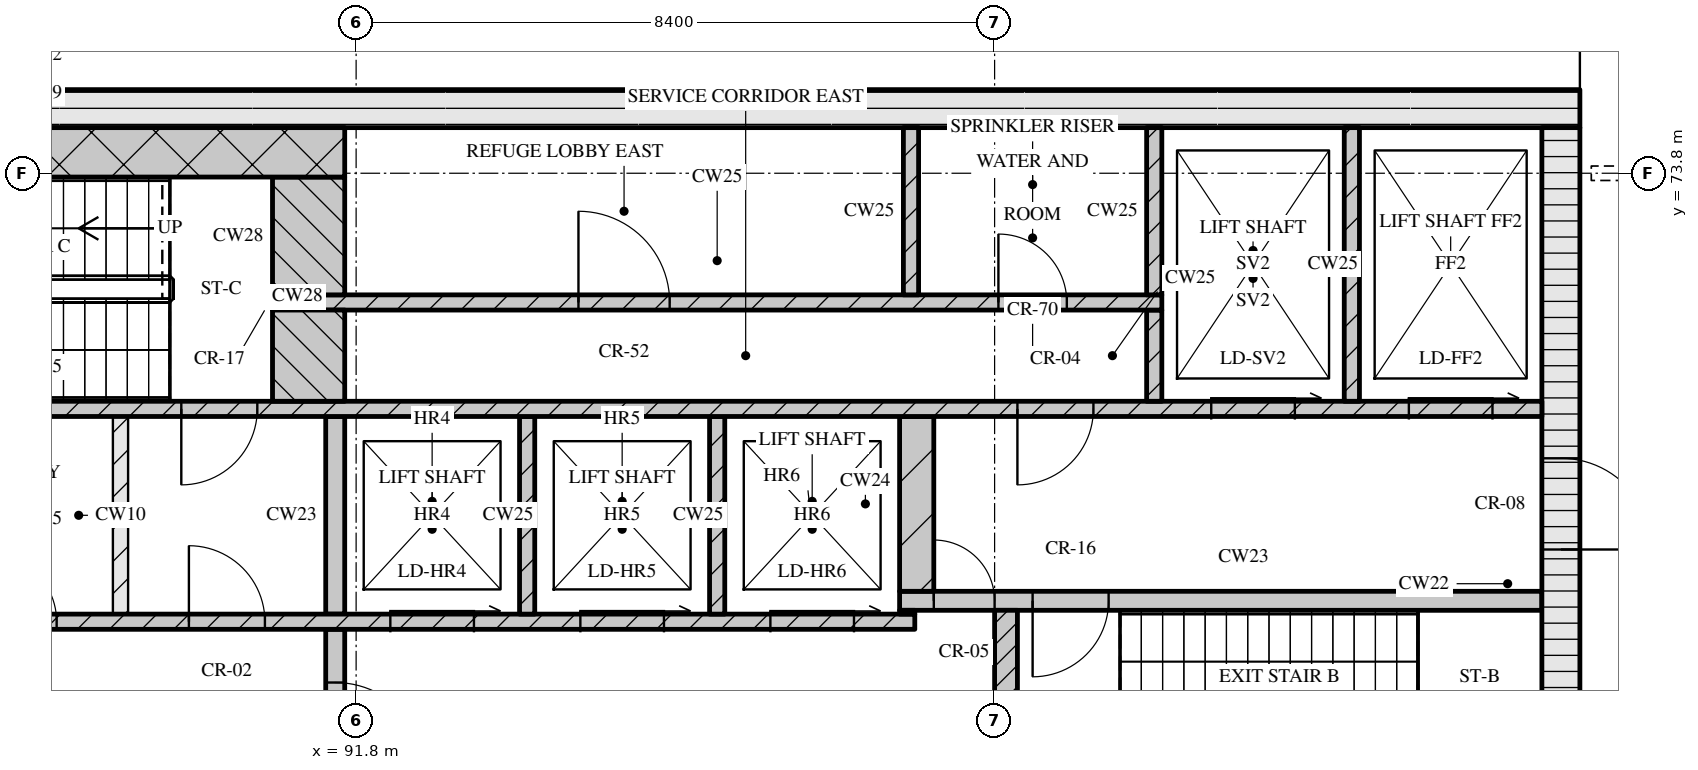
"""IFC4 building model, lengths in metres.
Left out: names, types, materials, properties, quantities, classifications, styles, units other than length and angle.
Written with IfcOpenShell. Run it as: python <this file> out.ifc"""

import sys

from ifc_helpers import new_model, si_unit, direction, frame, frame_2d, origin, place, context, subcontext, project, spatial, rectangle, extrude, element, fill, save


model = new_model("IFC4")
c1 = context("Model", 3, precision=1e-05, world=origin(), true_north=direction((0.0, 1.0)))
c2 = subcontext(c1, "Body", "Model", "MODEL_VIEW")
j1 = project(units=[si_unit("LENGTHUNIT", "METRE"), si_unit("PLANEANGLEUNIT", "RADIAN")], contexts=[c1])
p1 = place(None, origin())
s1 = spatial("IfcSite", under=j1, at=p1, CompositionType="ELEMENT")
p2 = place(p1, origin())
s2 = spatial("IfcBuilding", under=s1, at=p2, CompositionType="ELEMENT")
p3 = place(p2, frame((0.0, 0.0, 252.3)))
s3 = spatial("IfcBuildingStorey", under=s2, at=p3, CompositionType="ELEMENT", Elevation=252.3)
p4 = place(p3, frame((67.3, 74.65, 0.0), z_axis=(0.0, 0.0, 1.0), x_axis=(1.0, 0.0, 0.0)))
e1 = element("IfcWall", 1, at=p4, inside=s3, PredefinedType="SOLIDWALL", context=c2, shape_type="SweptSolid", body=[
    extrude(rectangle(XDim=40.6, YDim=0.5, at=frame_2d((20.3, 0.0))), origin(), (0.0, 0.0, 1.0), 10.97),
])
p5 = place(p3, frame((107.65, 62.4, 0.0), z_axis=(0.0, 0.0, 1.0), x_axis=(0.0, 1.0, 0.0)))
e2 = element("IfcWall", 2, at=p5, inside=s3, PredefinedType="SOLIDWALL", context=c2, shape_type="SweptSolid", body=[
    extrude(rectangle(XDim=12.0, YDim=0.5, at=frame_2d((6.0, 0.0))), origin(), (0.0, 0.0, 1.0), 10.97),
])
p6 = place(p5, frame((6.45, 0.0, 0.0)))
e3 = element("IfcOpeningElement", 3, at=p6, cuts=e2, PredefinedType="OPENING", context=c2, shape_type="SweptSolid", body=[
    extrude(rectangle(XDim=1.2, YDim=2.1, at=frame_2d((0.6, 1.05))), frame((0.0, 0.26, 0.0), z_axis=(0.0, -1.0, 0.0), x_axis=(1.0, 0.0, 0.0)), (0.0, 0.0, 1.0), 0.52),
])
p7 = place(p3, frame((91.525, 65.2, 0.0), z_axis=(0.0, 0.0, 1.0), x_axis=(0.0, 1.0, 0.0)))
e4 = element("IfcWall", 4, at=p7, inside=s3, PredefinedType="SOLIDWALL", context=c2, shape_type="SweptSolid", body=[
    extrude(rectangle(XDim=2.6, YDim=0.25, at=frame_2d((1.3, 0.0))), origin(), (0.0, 0.0, 1.0), 10.97),
])
p8 = place(p7, frame((0.7, 0.0, 0.0)))
e5 = element("IfcOpeningElement", 5, at=p8, cuts=e4, PredefinedType="OPENING", context=c2, shape_type="SweptSolid", body=[
    extrude(rectangle(XDim=1.2, YDim=2.1, at=frame_2d((0.6, 1.05))), frame((0.0, 0.135, 0.0), z_axis=(0.0, -1.0, 0.0), x_axis=(1.0, 0.0, 0.0)), (0.0, 0.0, 1.0), 0.27),
])
p9 = place(p3, frame((100.35, 65.2, 0.0), z_axis=(0.0, 0.0, 1.0), x_axis=(0.0, 1.0, 0.0)))
e6 = element("IfcWall", 6, at=p9, inside=s3, PredefinedType="SOLIDWALL", context=c2, shape_type="SweptSolid", body=[
    extrude(rectangle(XDim=2.85, YDim=0.3, at=frame_2d((1.425, 0.0))), origin(), (0.0, 0.0, 1.0), 10.97),
])
p10 = place(p3, frame((76.05, 67.9, 0.0), z_axis=(0.0, 0.0, 1.0), x_axis=(1.0, 0.0, 0.0)))
e7 = element("IfcWall", 7, at=p10, inside=s3, PredefinedType="SOLIDWALL", context=c2, shape_type="SweptSolid", body=[
    extrude(rectangle(XDim=23.1, YDim=0.2, at=frame_2d((11.55, 0.0))), origin(), (0.0, 0.0, 1.0), 10.97),
])
p11 = place(p10, frame((0.75, 0.0, 0.0)))
e8 = element("IfcOpeningElement", 8, at=p11, cuts=e7, PredefinedType="OPENING", context=c2, shape_type="SweptSolid", body=[
    extrude(rectangle(XDim=0.9, YDim=2.1, at=frame_2d((0.45, 1.05))), frame((0.0, 0.11, 0.0), z_axis=(0.0, -1.0, 0.0), x_axis=(1.0, 0.0, 0.0)), (0.0, 0.0, 1.0), 0.22),
])
p12 = place(p10, frame((3.32, 0.0, 0.0)))
e9 = element("IfcOpeningElement", 9, at=p12, cuts=e7, PredefinedType="OPENING", context=c2, shape_type="SweptSolid", body=[
    extrude(rectangle(XDim=0.9, YDim=2.1, at=frame_2d((0.45, 1.05))), frame((0.0, 0.11, 0.0), z_axis=(0.0, -1.0, 0.0), x_axis=(1.0, 0.0, 0.0)), (0.0, 0.0, 1.0), 0.22),
])
p13 = place(p10, frame((5.77, 0.0, 0.0)))
e10 = element("IfcOpeningElement", 10, at=p13, cuts=e7, PredefinedType="OPENING", context=c2, shape_type="SweptSolid", body=[
    extrude(rectangle(XDim=0.9, YDim=2.1, at=frame_2d((0.45, 1.05))), frame((0.0, 0.11, 0.0), z_axis=(0.0, -1.0, 0.0), x_axis=(1.0, 0.0, 0.0)), (0.0, 0.0, 1.0), 0.22),
])
p14 = place(p10, frame((8.45, 0.0, 0.0)))
e11 = element("IfcOpeningElement", 11, at=p14, cuts=e7, PredefinedType="OPENING", context=c2, shape_type="SweptSolid", body=[
    extrude(rectangle(XDim=0.9, YDim=2.1, at=frame_2d((0.45, 1.05))), frame((0.0, 0.11, 0.0), z_axis=(0.0, -1.0, 0.0), x_axis=(1.0, 0.0, 0.0)), (0.0, 0.0, 1.0), 0.22),
])
p15 = place(p10, frame((10.91, 0.0, 0.0)))
e12 = element("IfcOpeningElement", 12, at=p15, cuts=e7, PredefinedType="OPENING", context=c2, shape_type="SweptSolid", body=[
    extrude(rectangle(XDim=0.9, YDim=2.1, at=frame_2d((0.45, 1.05))), frame((0.0, 0.11, 0.0), z_axis=(0.0, -1.0, 0.0), x_axis=(1.0, 0.0, 0.0)), (0.0, 0.0, 1.0), 0.22),
])
p16 = place(p10, frame((13.55, 0.0, 0.0)))
e13 = element("IfcOpeningElement", 13, at=p16, cuts=e7, PredefinedType="OPENING", context=c2, shape_type="SweptSolid", body=[
    extrude(rectangle(XDim=1.0, YDim=2.1, at=frame_2d((0.5, 1.05))), frame((0.0, 0.11, 0.0), z_axis=(0.0, -1.0, 0.0), x_axis=(1.0, 0.0, 0.0)), (0.0, 0.0, 1.0), 0.22),
])
p17 = place(p10, frame((16.2, 0.0, 0.0)))
e14 = element("IfcOpeningElement", 14, at=p17, cuts=e7, PredefinedType="OPENING", context=c2, shape_type="SweptSolid", body=[
    extrude(rectangle(XDim=1.1, YDim=2.1, at=frame_2d((0.55, 1.05))), frame((0.0, 0.11, 0.0), z_axis=(0.0, -1.0, 0.0), x_axis=(1.0, 0.0, 0.0)), (0.0, 0.0, 1.0), 0.22),
])
p18 = place(p10, frame((18.7, 0.0, 0.0)))
e15 = element("IfcOpeningElement", 15, at=p18, cuts=e7, PredefinedType="OPENING", context=c2, shape_type="SweptSolid", body=[
    extrude(rectangle(XDim=1.1, YDim=2.1, at=frame_2d((0.55, 1.05))), frame((0.0, 0.11, 0.0), z_axis=(0.0, -1.0, 0.0), x_axis=(1.0, 0.0, 0.0)), (0.0, 0.0, 1.0), 0.22),
])
p19 = place(p10, frame((21.2, 0.0, 0.0)))
e16 = element("IfcOpeningElement", 16, at=p19, cuts=e7, PredefinedType="OPENING", context=c2, shape_type="SweptSolid", body=[
    extrude(rectangle(XDim=1.1, YDim=2.1, at=frame_2d((0.55, 1.05))), frame((0.0, 0.11, 0.0), z_axis=(0.0, -1.0, 0.0), x_axis=(1.0, 0.0, 0.0)), (0.0, 0.0, 1.0), 0.22),
])
p20 = place(p3, frame((88.7, 68.0, 0.0), z_axis=(0.0, 0.0, 1.0), x_axis=(0.0, 1.0, 0.0)))
e17 = element("IfcWall", 17, at=p20, inside=s3, PredefinedType="PARTITIONING", context=c2, shape_type="SweptSolid", body=[
    extrude(rectangle(XDim=2.6, YDim=0.2, at=frame_2d((1.3, 0.0))), origin(), (0.0, 0.0, 1.0), 10.97),
])
p21 = place(p3, frame((91.525, 68.0, 0.0), z_axis=(0.0, 0.0, 1.0), x_axis=(0.0, 1.0, 0.0)))
e18 = element("IfcWall", 18, at=p21, inside=s3, PredefinedType="SOLIDWALL", context=c2, shape_type="SweptSolid", body=[
    extrude(rectangle(XDim=2.6, YDim=0.25, at=frame_2d((1.3, 0.0))), origin(), (0.0, 0.0, 1.0), 10.97),
])
for number, where, z_axis, x_axis in (
    (19, (94.05, 68.0, 0.0), (0.0, 0.0, 1.0), (0.0, 1.0, 0.0)),
    (20, (96.55, 68.0, 0.0), (0.0, 0.0, 1.0), (0.0, 1.0, 0.0)),
):
    element("IfcWall", number, at=place(p3, frame(where, z_axis=z_axis, x_axis=x_axis)), inside=s3, PredefinedType="SOLIDWALL", context=c2, shape_type="SweptSolid", body=[
        extrude(rectangle(XDim=2.6, YDim=0.2, at=frame_2d((1.3, 0.0))), origin(), (0.0, 0.0, 1.0), 10.97),
    ])
p22 = place(p3, frame((98.95, 68.025, 0.0), z_axis=(0.0, 0.0, 1.0), x_axis=(1.0, 0.0, 0.0)))
e21 = element("IfcWall", 21, at=p22, inside=s3, PredefinedType="SOLIDWALL", context=c2, shape_type="SweptSolid", body=[
    extrude(rectangle(XDim=0.2, YDim=0.05, at=frame_2d((0.1, 0.0))), origin(), (0.0, 0.0, 1.0), 10.97),
])
p23 = place(p3, frame((98.95, 68.175, 0.0), z_axis=(0.0, 0.0, 1.0), x_axis=(1.0, 0.0, 0.0)))
e22 = element("IfcWall", 22, at=p23, inside=s3, PredefinedType="SOLIDWALL", context=c2, shape_type="SweptSolid", body=[
    extrude(rectangle(XDim=8.45, YDim=0.25, at=frame_2d((4.225, 0.0))), origin(), (0.0, 0.0, 1.0), 10.97),
])
p24 = place(p23, frame((0.45, 0.0, 0.0)))
e23 = element("IfcOpeningElement", 23, at=p24, cuts=e22, PredefinedType="OPENING", context=c2, shape_type="SweptSolid", body=[
    extrude(rectangle(XDim=0.8, YDim=2.1, at=frame_2d((0.4, 1.05))), frame((0.0, 0.135, 0.0), z_axis=(0.0, -1.0, 0.0), x_axis=(1.0, 0.0, 0.0)), (0.0, 0.0, 1.0), 0.27),
])
p25 = place(p23, frame((1.75, 0.0, 0.0)))
e24 = element("IfcOpeningElement", 24, at=p25, cuts=e22, PredefinedType="OPENING", context=c2, shape_type="SweptSolid", body=[
    extrude(rectangle(XDim=1.0, YDim=2.1, at=frame_2d((0.5, 1.05))), frame((0.0, 0.135, 0.0), z_axis=(0.0, -1.0, 0.0), x_axis=(1.0, 0.0, 0.0)), (0.0, 0.0, 1.0), 0.27),
])
p26 = place(p3, frame((99.175, 68.3, 0.0), z_axis=(0.0, 0.0, 1.0), x_axis=(0.0, 1.0, 0.0)))
e25 = element("IfcWall", 25, at=p26, inside=s3, PredefinedType="SOLIDWALL", context=c2, shape_type="SweptSolid", body=[
    extrude(rectangle(XDim=2.3, YDim=0.45, at=frame_2d((1.15, 0.0))), origin(), (0.0, 0.0, 1.0), 10.97),
])
p27 = place(p3, frame((67.8, 70.7, 0.0), z_axis=(0.0, 0.0, 1.0), x_axis=(1.0, 0.0, 0.0)))
e26 = element("IfcWall", 26, at=p27, inside=s3, PredefinedType="SOLIDWALL", context=c2, shape_type="SweptSolid", body=[
    extrude(rectangle(XDim=39.6, YDim=0.2, at=frame_2d((19.8, 0.0))), origin(), (0.0, 0.0, 1.0), 10.97),
])
p28 = place(p27, frame((0.65, 0.0, 0.0)))
e27 = element("IfcOpeningElement", 27, at=p28, cuts=e26, PredefinedType="OPENING", context=c2, shape_type="SweptSolid", body=[
    extrude(rectangle(XDim=1.1, YDim=2.1, at=frame_2d((0.55, 1.05))), frame((0.0, 0.11, 0.0), z_axis=(0.0, -1.0, 0.0), x_axis=(1.0, 0.0, 0.0)), (0.0, 0.0, 1.0), 0.22),
])
p29 = place(p27, frame((3.25, 0.0, 0.0)))
e28 = element("IfcOpeningElement", 28, at=p29, cuts=e26, PredefinedType="OPENING", context=c2, shape_type="SweptSolid", body=[
    extrude(rectangle(XDim=1.1, YDim=2.1, at=frame_2d((0.55, 1.05))), frame((0.0, 0.11, 0.0), z_axis=(0.0, -1.0, 0.0), x_axis=(1.0, 0.0, 0.0)), (0.0, 0.0, 1.0), 0.22),
])
p30 = place(p27, frame((5.9, 0.0, 0.0)))
e29 = element("IfcOpeningElement", 29, at=p30, cuts=e26, PredefinedType="OPENING", context=c2, shape_type="SweptSolid", body=[
    extrude(rectangle(XDim=1.0, YDim=2.1, at=frame_2d((0.5, 1.05))), frame((0.0, 0.11, 0.0), z_axis=(0.0, -1.0, 0.0), x_axis=(1.0, 0.0, 0.0)), (0.0, 0.0, 1.0), 0.22),
])
p31 = place(p27, frame((21.7, 0.0, 0.0)))
e30 = element("IfcOpeningElement", 30, at=p31, cuts=e26, PredefinedType="OPENING", context=c2, shape_type="SweptSolid", body=[
    extrude(rectangle(XDim=1.0, YDim=2.1, at=frame_2d((0.5, 1.05))), frame((0.0, 0.11, 0.0), z_axis=(0.0, -1.0, 0.0), x_axis=(1.0, 0.0, 0.0)), (0.0, 0.0, 1.0), 0.22),
])
p32 = place(p27, frame((32.7, 0.0, 0.0)))
e31 = element("IfcOpeningElement", 31, at=p32, cuts=e26, PredefinedType="OPENING", context=c2, shape_type="SweptSolid", body=[
    extrude(rectangle(XDim=1.0, YDim=2.1, at=frame_2d((0.5, 1.05))), frame((0.0, 0.11, 0.0), z_axis=(0.0, -1.0, 0.0), x_axis=(1.0, 0.0, 0.0)), (0.0, 0.0, 1.0), 0.22),
])
p33 = place(p27, frame((35.25, 0.0, 0.0)))
e32 = element("IfcOpeningElement", 32, at=p33, cuts=e26, PredefinedType="OPENING", context=c2, shape_type="SweptSolid", body=[
    extrude(rectangle(XDim=1.1, YDim=2.1, at=frame_2d((0.55, 1.05))), frame((0.0, 0.11, 0.0), z_axis=(0.0, -1.0, 0.0), x_axis=(1.0, 0.0, 0.0)), (0.0, 0.0, 1.0), 0.22),
])
p34 = place(p27, frame((37.85, 0.0, 0.0)))
e33 = element("IfcOpeningElement", 33, at=p34, cuts=e26, PredefinedType="OPENING", context=c2, shape_type="SweptSolid", body=[
    extrude(rectangle(XDim=1.1, YDim=2.1, at=frame_2d((0.55, 1.05))), frame((0.0, 0.11, 0.0), z_axis=(0.0, -1.0, 0.0), x_axis=(1.0, 0.0, 0.0)), (0.0, 0.0, 1.0), 0.22),
])
p35 = place(p3, frame((91.175, 70.8, 0.0), z_axis=(0.0, 0.0, 1.0), x_axis=(0.0, 1.0, 0.0)))
e34 = element("IfcWall", 34, at=p35, inside=s3, PredefinedType="SOLIDWALL", context=c2, shape_type="SweptSolid", body=[
    extrude(rectangle(XDim=1.2, YDim=0.95, at=frame_2d((0.6, 0.0))), origin(), (0.0, 0.0, 1.0), 10.97),
])
p36 = place(p3, frame((102.3, 70.8, 0.0), z_axis=(0.0, 0.0, 1.0), x_axis=(0.0, 1.0, 0.0)))
e35 = element("IfcWall", 35, at=p36, inside=s3, PredefinedType="SOLIDWALL", context=c2, shape_type="SweptSolid", body=[
    extrude(rectangle(XDim=1.2, YDim=0.2, at=frame_2d((0.6, 0.0))), origin(), (0.0, 0.0, 1.0), 10.97),
])
p37 = place(p3, frame((104.9, 70.8, 0.0), z_axis=(0.0, 0.0, 1.0), x_axis=(0.0, 1.0, 0.0)))
e36 = element("IfcWall", 36, at=p37, inside=s3, PredefinedType="SOLIDWALL", context=c2, shape_type="SweptSolid", body=[
    extrude(rectangle(XDim=3.6, YDim=0.2, at=frame_2d((1.8, 0.0))), origin(), (0.0, 0.0, 1.0), 10.97),
])
p38 = place(p3, frame((90.7, 72.1, 0.0), z_axis=(0.0, 0.0, 1.0), x_axis=(1.0, 0.0, 0.0)))
e37 = element("IfcWall", 37, at=p38, inside=s3, PredefinedType="SOLIDWALL", context=c2, shape_type="SweptSolid", body=[
    extrude(rectangle(XDim=11.7, YDim=0.2, at=frame_2d((5.85, 0.0))), origin(), (0.0, 0.0, 1.0), 10.97),
])
p39 = place(p38, frame((4.025, 0.0, 0.0)))
e38 = element("IfcOpeningElement", 38, at=p39, cuts=e37, PredefinedType="OPENING", context=c2, shape_type="SweptSolid", body=[
    extrude(rectangle(XDim=1.2, YDim=2.1, at=frame_2d((0.6, 1.05))), frame((0.0, 0.11, 0.0), z_axis=(0.0, -1.0, 0.0), x_axis=(1.0, 0.0, 0.0)), (0.0, 0.0, 1.0), 0.22),
])
p40 = place(p38, frame((9.55, 0.0, 0.0)))
e39 = element("IfcOpeningElement", 39, at=p40, cuts=e37, PredefinedType="OPENING", context=c2, shape_type="SweptSolid", body=[
    extrude(rectangle(XDim=0.9, YDim=2.1, at=frame_2d((0.45, 1.05))), frame((0.0, 0.11, 0.0), z_axis=(0.0, -1.0, 0.0), x_axis=(1.0, 0.0, 0.0)), (0.0, 0.0, 1.0), 0.22),
])
p41 = place(p3, frame((91.175, 72.2, 0.0), z_axis=(0.0, 0.0, 1.0), x_axis=(0.0, 1.0, 0.0)))
e40 = element("IfcWall", 40, at=p41, inside=s3, PredefinedType="SOLIDWALL", context=c2, shape_type="SweptSolid", body=[
    extrude(rectangle(XDim=1.55, YDim=0.95, at=frame_2d((0.775, 0.0))), origin(), (0.0, 0.0, 1.0), 10.97),
])
for number, where, z_axis, x_axis in (
    (41, (99.1, 72.2, 0.0), (0.0, 0.0, 1.0), (0.0, 1.0, 0.0)),
    (42, (102.3, 72.2, 0.0), (0.0, 0.0, 1.0), (0.0, 1.0, 0.0)),
):
    element("IfcWall", number, at=place(p3, frame(where, z_axis=z_axis, x_axis=x_axis)), inside=s3, PredefinedType="SOLIDWALL", context=c2, shape_type="SweptSolid", body=[
        extrude(rectangle(XDim=2.2, YDim=0.2, at=frame_2d((1.1, 0.0))), origin(), (0.0, 0.0, 1.0), 10.97),
    ])
p42 = place(p3, frame((83.55, 74.075, 0.0), z_axis=(0.0, 0.0, 1.0), x_axis=(1.0, 0.0, 0.0)))
e43 = element("IfcWall", 43, at=p42, inside=s3, PredefinedType="SOLIDWALL", context=c2, shape_type="SweptSolid", body=[
    extrude(rectangle(XDim=8.1, YDim=0.65, at=frame_2d((4.05, 0.0))), origin(), (0.0, 0.0, 1.0), 10.97),
])
p43 = place(p8, origin())
e44 = element("IfcDoor", 44, at=p43, inside=s3, OperationType="SINGLE_SWING_RIGHT", PredefinedType="DOOR", context=c2, shape_type="SweptSolid", body=[
    extrude(rectangle(XDim=1.2, YDim=2.1, at=frame_2d((0.6, 1.05))), frame((0.0, 0.025, 0.0), z_axis=(0.0, -1.0, 0.0), x_axis=(1.0, 0.0, 0.0)), (0.0, 0.0, 1.0), 0.05),
])
fill(e5, e44)
p44 = place(p15, origin())
e45 = element("IfcDoor", 45, at=p44, inside=s3, OperationType="SINGLE_SWING_LEFT", PredefinedType="DOOR", context=c2, shape_type="SweptSolid", body=[
    extrude(rectangle(XDim=0.9, YDim=2.1, at=frame_2d((0.45, 1.05))), frame((0.0, 0.025, 0.0), z_axis=(0.0, -1.0, 0.0), x_axis=(1.0, 0.0, 0.0)), (0.0, 0.0, 1.0), 0.05),
])
fill(e12, e45)
p45 = place(p16, origin())
e46 = element("IfcDoor", 46, at=p45, inside=s3, OperationType="SINGLE_SWING_LEFT", PredefinedType="DOOR", context=c2, shape_type="SweptSolid", body=[
    extrude(rectangle(XDim=1.0, YDim=2.1, at=frame_2d((0.5, 1.05))), frame((0.0, 0.025, 0.0), z_axis=(0.0, -1.0, 0.0), x_axis=(1.0, 0.0, 0.0)), (0.0, 0.0, 1.0), 0.05),
])
fill(e13, e46)
p46 = place(p17, origin())
e47 = element("IfcDoor", 47, at=p46, inside=s3, OperationType="SLIDING_TO_RIGHT", PredefinedType="DOOR", context=c2, shape_type="SweptSolid", body=[
    extrude(rectangle(XDim=1.1, YDim=2.1, at=frame_2d((0.55, 1.05))), frame((0.0, 0.025, 0.0), z_axis=(0.0, -1.0, 0.0), x_axis=(1.0, 0.0, 0.0)), (0.0, 0.0, 1.0), 0.05),
])
fill(e14, e47)
p47 = place(p18, origin())
e48 = element("IfcDoor", 48, at=p47, inside=s3, OperationType="SLIDING_TO_RIGHT", PredefinedType="DOOR", context=c2, shape_type="SweptSolid", body=[
    extrude(rectangle(XDim=1.1, YDim=2.1, at=frame_2d((0.55, 1.05))), frame((0.0, 0.025, 0.0), z_axis=(0.0, -1.0, 0.0), x_axis=(1.0, 0.0, 0.0)), (0.0, 0.0, 1.0), 0.05),
])
fill(e15, e48)
p48 = place(p19, origin())
e49 = element("IfcDoor", 49, at=p48, inside=s3, OperationType="SLIDING_TO_RIGHT", PredefinedType="DOOR", context=c2, shape_type="SweptSolid", body=[
    extrude(rectangle(XDim=1.1, YDim=2.1, at=frame_2d((0.55, 1.05))), frame((0.0, 0.025, 0.0), z_axis=(0.0, -1.0, 0.0), x_axis=(1.0, 0.0, 0.0)), (0.0, 0.0, 1.0), 0.05),
])
fill(e16, e49)
p49 = place(p24, origin())
e50 = element("IfcDoor", 50, at=p49, inside=s3, OperationType="SINGLE_SWING_LEFT", PredefinedType="DOOR", context=c2, shape_type="SweptSolid", body=[
    extrude(rectangle(XDim=0.8, YDim=2.1, at=frame_2d((0.4, 1.05))), frame((0.0, 0.025, 0.0), z_axis=(0.0, -1.0, 0.0), x_axis=(1.0, 0.0, 0.0)), (0.0, 0.0, 1.0), 0.05),
])
fill(e23, e50)
p50 = place(p25, origin())
e51 = element("IfcDoor", 51, at=p50, inside=s3, OperationType="SINGLE_SWING_RIGHT", PredefinedType="DOOR", context=c2, shape_type="SweptSolid", body=[
    extrude(rectangle(XDim=1.0, YDim=2.1, at=frame_2d((0.5, 1.05))), frame((0.0, 0.025, 0.0), z_axis=(0.0, -1.0, 0.0), x_axis=(1.0, 0.0, 0.0)), (0.0, 0.0, 1.0), 0.05),
])
fill(e24, e51)
p51 = place(p6, origin())
e52 = element("IfcDoor", 52, at=p51, inside=s3, OperationType="SINGLE_SWING_RIGHT", PredefinedType="DOOR", context=c2, shape_type="SweptSolid", body=[
    extrude(rectangle(XDim=1.2, YDim=2.1, at=frame_2d((0.6, 1.05))), frame((0.0, 0.025, 0.0), z_axis=(0.0, -1.0, 0.0), x_axis=(1.0, 0.0, 0.0)), (0.0, 0.0, 1.0), 0.05),
])
fill(e3, e52)
p52 = place(p31, origin())
e53 = element("IfcDoor", 53, at=p52, inside=s3, OperationType="SINGLE_SWING_RIGHT", PredefinedType="DOOR", context=c2, shape_type="SweptSolid", body=[
    extrude(rectangle(XDim=1.0, YDim=2.1, at=frame_2d((0.5, 1.05))), frame((0.0, 0.025, 0.0), z_axis=(0.0, -1.0, 0.0), x_axis=(1.0, 0.0, 0.0)), (0.0, 0.0, 1.0), 0.05),
])
fill(e30, e53)
p53 = place(p32, origin())
e54 = element("IfcDoor", 54, at=p53, inside=s3, OperationType="SINGLE_SWING_RIGHT", PredefinedType="DOOR", context=c2, shape_type="SweptSolid", body=[
    extrude(rectangle(XDim=1.0, YDim=2.1, at=frame_2d((0.5, 1.05))), frame((0.0, 0.025, 0.0), z_axis=(0.0, -1.0, 0.0), x_axis=(1.0, 0.0, 0.0)), (0.0, 0.0, 1.0), 0.05),
])
fill(e31, e54)
p54 = place(p33, origin())
e55 = element("IfcDoor", 55, at=p54, inside=s3, OperationType="SLIDING_TO_RIGHT", PredefinedType="DOOR", context=c2, shape_type="SweptSolid", body=[
    extrude(rectangle(XDim=1.1, YDim=2.1, at=frame_2d((0.55, 1.05))), frame((0.0, 0.025, 0.0), z_axis=(0.0, -1.0, 0.0), x_axis=(1.0, 0.0, 0.0)), (0.0, 0.0, 1.0), 0.05),
])
fill(e32, e55)
p55 = place(p34, origin())
e56 = element("IfcDoor", 56, at=p55, inside=s3, OperationType="SLIDING_TO_RIGHT", PredefinedType="DOOR", context=c2, shape_type="SweptSolid", body=[
    extrude(rectangle(XDim=1.1, YDim=2.1, at=frame_2d((0.55, 1.05))), frame((0.0, 0.025, 0.0), z_axis=(0.0, -1.0, 0.0), x_axis=(1.0, 0.0, 0.0)), (0.0, 0.0, 1.0), 0.05),
])
fill(e33, e56)
p56 = place(p39, origin())
e57 = element("IfcDoor", 57, at=p56, inside=s3, OperationType="SINGLE_SWING_LEFT", PredefinedType="DOOR", context=c2, shape_type="SweptSolid", body=[
    extrude(rectangle(XDim=1.2, YDim=2.1, at=frame_2d((0.6, 1.05))), frame((0.0, 0.025, 0.0), z_axis=(0.0, -1.0, 0.0), x_axis=(1.0, 0.0, 0.0)), (0.0, 0.0, 1.0), 0.05),
])
fill(e38, e57)
p57 = place(p40, origin())
e58 = element("IfcDoor", 58, at=p57, inside=s3, OperationType="SINGLE_SWING_LEFT", PredefinedType="DOOR", context=c2, shape_type="SweptSolid", body=[
    extrude(rectangle(XDim=0.9, YDim=2.1, at=frame_2d((0.45, 1.05))), frame((0.0, 0.025, 0.0), z_axis=(0.0, -1.0, 0.0), x_axis=(1.0, 0.0, 0.0)), (0.0, 0.0, 1.0), 0.05),
])
fill(e39, e58)
save(model, sys.argv[1])
